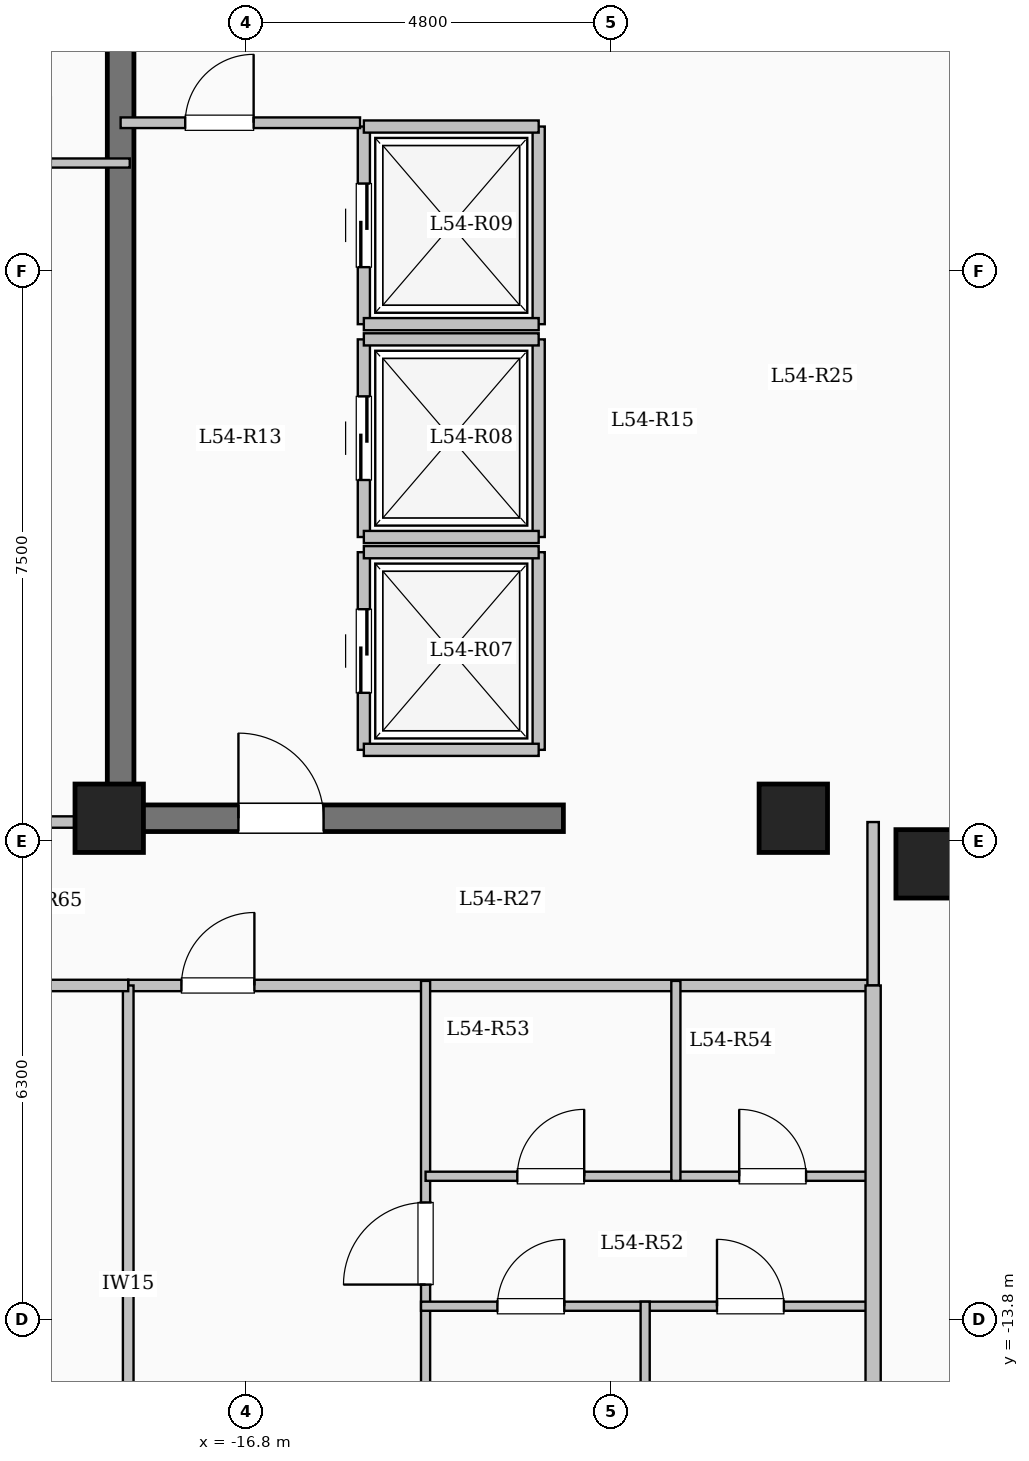
"""IFC4 building model, lengths in metres.
Left out: names, types, materials, properties, quantities, classifications, styles, units other than length and angle.
Written with IfcOpenShell. Run it as: python <this file> out.ifc"""

import sys

from ifc_helpers import new_model, si_unit, direction, frame, frame_2d, origin, origin_2d, place, context, subcontext, project, spatial, rectangle, extrude, element, fill, save


model = new_model("IFC4")
c1 = context("Model", 3, precision=1e-05, world=origin(), true_north=direction((0.0, 1.0)))
c2 = subcontext(c1, "Body", "Model", "MODEL_VIEW")
j1 = project(units=[si_unit("LENGTHUNIT", "METRE"), si_unit("PLANEANGLEUNIT", "RADIAN")], contexts=[c1])
p1 = place(None, origin())
s1 = spatial("IfcSite", under=j1, at=p1, CompositionType="ELEMENT")
p2 = place(p1, origin())
s2 = spatial("IfcBuilding", under=s1, at=p2, CompositionType="ELEMENT")
p3 = place(p2, frame((0.0, 0.0, 200.3)))
s3 = spatial("IfcBuildingStorey", under=s2, at=p3, CompositionType="ELEMENT", Elevation=200.3)
for number, where, z_axis, x_axis in (
    (1, (-7.8, -7.8, 0.0), (0.0, 0.0, 1.0), (1.0, 0.0, 0.0)),
    (2, (-9.6, -7.2, 0.0), (0.0, 0.0, 1.0), (1.0, 0.0, 0.0)),
    (3, (-18.6, -7.2, 0.0), (0.0, 0.0, 1.0), (1.0, 0.0, 0.0)),
):
    element("IfcColumn", number, at=place(p3, frame(where, z_axis=z_axis, x_axis=x_axis)), inside=s3, PredefinedType="COLUMN", context=c2, shape_type="SweptSolid", body=[
        extrude(rectangle(XDim=0.9, YDim=0.9, at=origin_2d()), origin(), (0.0, 0.0, 1.0), 3.35),
    ])
p4 = place(p3, frame((-15.25, -6.3, 0.0), z_axis=(0.0, 0.0, 1.0), x_axis=(0.0, 1.0, 0.0)))
e4 = element("IfcWall", 4, at=p4, inside=s3, PredefinedType="SOLIDWALL", context=c2, shape_type="SweptSolid", body=[
    extrude(rectangle(XDim=2.6, YDim=0.16, at=frame_2d((1.3, 0.0))), origin(), (0.0, 0.0, 1.0), 3.1),
])
p5 = place(p4, frame((0.75, 0.0, 0.0)))
e5 = element("IfcOpeningElement", 5, at=p5, cuts=e4, PredefinedType="OPENING", context=c2, shape_type="SweptSolid", body=[
    extrude(rectangle(XDim=1.1, YDim=2.15, at=frame_2d((0.55, 1.075))), frame((0.0, 0.09, 0.0), z_axis=(0.0, -1.0, 0.0), x_axis=(1.0, 0.0, 0.0)), (0.0, 0.0, 1.0), 0.18),
])
p6 = place(p3, frame((-12.95, -6.3, 0.0), z_axis=(0.0, 0.0, 1.0), x_axis=(0.0, 1.0, 0.0)))
e6 = element("IfcWall", 6, at=p6, inside=s3, PredefinedType="SOLIDWALL", context=c2, shape_type="SweptSolid", body=[
    extrude(rectangle(XDim=2.6, YDim=0.16, at=frame_2d((1.3, 0.0))), origin(), (0.0, 0.0, 1.0), 3.1),
])
for number, where, z_axis, x_axis in (
    (7, (-15.25, -6.3, 0.0), (0.0, 0.0, 1.0), (1.0, 0.0, 0.0)),
    (8, (-15.25, -3.7, 0.0), (0.0, 0.0, 1.0), (1.0, 0.0, 0.0)),
):
    element("IfcWall", number, at=place(p3, frame(where, z_axis=z_axis, x_axis=x_axis)), inside=s3, PredefinedType="SOLIDWALL", context=c2, shape_type="SweptSolid", body=[
        extrude(rectangle(XDim=2.3, YDim=0.16, at=frame_2d((1.15, 0.0))), origin(), (0.0, 0.0, 1.0), 3.1),
    ])
p7 = place(p3, frame((-15.25, -3.5, 0.0), z_axis=(0.0, 0.0, 1.0), x_axis=(0.0, 1.0, 0.0)))
e9 = element("IfcWall", 9, at=p7, inside=s3, PredefinedType="SOLIDWALL", context=c2, shape_type="SweptSolid", body=[
    extrude(rectangle(XDim=2.6, YDim=0.16, at=frame_2d((1.3, 0.0))), origin(), (0.0, 0.0, 1.0), 3.1),
])
p8 = place(p7, frame((0.75, 0.0, 0.0)))
e10 = element("IfcOpeningElement", 10, at=p8, cuts=e9, PredefinedType="OPENING", context=c2, shape_type="SweptSolid", body=[
    extrude(rectangle(XDim=1.1, YDim=2.15, at=frame_2d((0.55, 1.075))), frame((0.0, 0.09, 0.0), z_axis=(0.0, -1.0, 0.0), x_axis=(1.0, 0.0, 0.0)), (0.0, 0.0, 1.0), 0.18),
])
p9 = place(p3, frame((-12.95, -3.5, 0.0), z_axis=(0.0, 0.0, 1.0), x_axis=(0.0, 1.0, 0.0)))
e11 = element("IfcWall", 11, at=p9, inside=s3, PredefinedType="SOLIDWALL", context=c2, shape_type="SweptSolid", body=[
    extrude(rectangle(XDim=2.6, YDim=0.16, at=frame_2d((1.3, 0.0))), origin(), (0.0, 0.0, 1.0), 3.1),
])
for number, where, z_axis, x_axis in (
    (12, (-15.25, -3.5, 0.0), (0.0, 0.0, 1.0), (1.0, 0.0, 0.0)),
    (13, (-15.25, -0.9, 0.0), (0.0, 0.0, 1.0), (1.0, 0.0, 0.0)),
):
    element("IfcWall", number, at=place(p3, frame(where, z_axis=z_axis, x_axis=x_axis)), inside=s3, PredefinedType="SOLIDWALL", context=c2, shape_type="SweptSolid", body=[
        extrude(rectangle(XDim=2.3, YDim=0.16, at=frame_2d((1.15, 0.0))), origin(), (0.0, 0.0, 1.0), 3.1),
    ])
p10 = place(p3, frame((-15.25, -0.7, 0.0), z_axis=(0.0, 0.0, 1.0), x_axis=(0.0, 1.0, 0.0)))
e14 = element("IfcWall", 14, at=p10, inside=s3, PredefinedType="SOLIDWALL", context=c2, shape_type="SweptSolid", body=[
    extrude(rectangle(XDim=2.6, YDim=0.16, at=frame_2d((1.3, 0.0))), origin(), (0.0, 0.0, 1.0), 3.1),
])
p11 = place(p10, frame((0.75, 0.0, 0.0)))
e15 = element("IfcOpeningElement", 15, at=p11, cuts=e14, PredefinedType="OPENING", context=c2, shape_type="SweptSolid", body=[
    extrude(rectangle(XDim=1.1, YDim=2.15, at=frame_2d((0.55, 1.075))), frame((0.0, 0.09, 0.0), z_axis=(0.0, -1.0, 0.0), x_axis=(1.0, 0.0, 0.0)), (0.0, 0.0, 1.0), 0.18),
])
p12 = place(p3, frame((-12.95, -0.7, 0.0), z_axis=(0.0, 0.0, 1.0), x_axis=(0.0, 1.0, 0.0)))
e16 = element("IfcWall", 16, at=p12, inside=s3, PredefinedType="SOLIDWALL", context=c2, shape_type="SweptSolid", body=[
    extrude(rectangle(XDim=2.6, YDim=0.16, at=frame_2d((1.3, 0.0))), origin(), (0.0, 0.0, 1.0), 3.1),
])
for number, where, z_axis, x_axis in (
    (17, (-15.25, -0.7, 0.0), (0.0, 0.0, 1.0), (1.0, 0.0, 0.0)),
    (18, (-15.25, 1.9, 0.0), (0.0, 0.0, 1.0), (1.0, 0.0, 0.0)),
):
    element("IfcWall", number, at=place(p3, frame(where, z_axis=z_axis, x_axis=x_axis)), inside=s3, PredefinedType="SOLIDWALL", context=c2, shape_type="SweptSolid", body=[
        extrude(rectangle(XDim=2.3, YDim=0.16, at=frame_2d((1.15, 0.0))), origin(), (0.0, 0.0, 1.0), 3.1),
    ])
p13 = place(p3, frame((-18.45, -7.375, 0.0), z_axis=(0.0, 0.0, 1.0), x_axis=(0.0, 1.0, 0.0)))
e19 = element("IfcWall", 19, at=p13, inside=s3, PredefinedType="SHEAR", context=c2, shape_type="SweptSolid", body=[
    extrude(rectangle(XDim=14.05, YDim=0.35, at=frame_2d((7.025, 0.0))), origin(), (0.0, 0.0, 1.0), 3.35),
])
p14 = place(p3, frame((-18.625, -7.2, 0.0), z_axis=(0.0, 0.0, 1.0), x_axis=(1.0, 0.0, 0.0)))
e20 = element("IfcWall", 20, at=p14, inside=s3, PredefinedType="SHEAR", context=c2, shape_type="SweptSolid", body=[
    extrude(rectangle(XDim=6.0, YDim=0.35, at=frame_2d((3.0, 0.0))), origin(), (0.0, 0.0, 1.0), 3.35),
])
p15 = place(p14, frame((1.725, 0.0, 0.0)))
e21 = element("IfcOpeningElement", 21, at=p15, cuts=e20, PredefinedType="OPENING", context=c2, shape_type="SweptSolid", body=[
    extrude(rectangle(XDim=1.12, YDim=2.15, at=frame_2d((0.56, 1.075))), frame((0.0, 0.185, 0.0), z_axis=(0.0, -1.0, 0.0), x_axis=(1.0, 0.0, 0.0)), (0.0, 0.0, 1.0), 0.37),
])
p16 = place(p3, frame((-18.45, 1.95, 0.0), z_axis=(0.0, 0.0, 1.0), x_axis=(1.0, 0.0, 0.0)))
e22 = element("IfcWall", 22, at=p16, inside=s3, PredefinedType="PARTITIONING", context=c2, shape_type="SweptSolid", body=[
    extrude(rectangle(XDim=3.15, YDim=0.14, at=frame_2d((1.575, 0.0))), origin(), (0.0, 0.0, 1.0), 3.1),
])
p17 = place(p16, frame((0.85, 0.0, 0.0)))
e23 = element("IfcOpeningElement", 23, at=p17, cuts=e22, PredefinedType="OPENING", context=c2, shape_type="SweptSolid", body=[
    extrude(rectangle(XDim=0.9, YDim=2.08, at=frame_2d((0.45, 1.04))), frame((0.0, 0.08, 0.0), z_axis=(0.0, -1.0, 0.0), x_axis=(1.0, 0.0, 0.0)), (0.0, 0.0, 1.0), 0.16),
])
p18 = place(p3, frame((-18.35, -9.4, 0.0), z_axis=(0.0, 0.0, 1.0), x_axis=(1.0, 0.0, 0.0)))
e24 = element("IfcWall", 24, at=p18, inside=s3, PredefinedType="PARTITIONING", context=c2, shape_type="SweptSolid", body=[
    extrude(rectangle(XDim=9.8, YDim=0.15, at=frame_2d((4.9, 0.0))), origin(), (0.0, 0.0, 1.0), 3.1),
])
p19 = place(p18, frame((0.7, 0.0, 0.0)))
e25 = element("IfcOpeningElement", 25, at=p19, cuts=e24, PredefinedType="OPENING", context=c2, shape_type="SweptSolid", body=[
    extrude(rectangle(XDim=0.96, YDim=2.15, at=frame_2d((0.48, 1.075))), frame((0.0, 0.085, 0.0), z_axis=(0.0, -1.0, 0.0), x_axis=(1.0, 0.0, 0.0)), (0.0, 0.0, 1.0), 0.17),
])
p20 = place(p3, frame((-8.55, -9.4, 0.0), z_axis=(0.0, 0.0, 1.0), x_axis=(0.0, 1.0, 0.0)))
e26 = element("IfcWall", 26, at=p20, inside=s3, PredefinedType="PARTITIONING", context=c2, shape_type="SweptSolid", body=[
    extrude(rectangle(XDim=2.15, YDim=0.15, at=frame_2d((1.075, 0.0))), origin(), (0.0, 0.0, 1.0), 3.1),
])
p21 = place(p3, frame((-14.438, -20.9, 0.0), z_axis=(0.0, 0.0, 1.0), x_axis=(0.0, 1.0, 0.0)))
e27 = element("IfcWall", 27, at=p21, inside=s3, PredefinedType="PARTITIONING", context=c2, shape_type="SweptSolid", body=[
    extrude(rectangle(XDim=11.56, YDim=0.12, at=frame_2d((5.78, 0.0))), origin(), (0.0, 0.0, 1.0), 3.1),
])
p22 = place(p21, frame((7.565, 0.0, 0.0)))
e28 = element("IfcOpeningElement", 28, at=p22, cuts=e27, PredefinedType="OPENING", context=c2, shape_type="SweptSolid", body=[
    extrude(rectangle(XDim=1.08, YDim=2.15, at=frame_2d((0.54, 1.075))), frame((0.0, 0.07, 0.0), z_axis=(0.0, -1.0, 0.0), x_axis=(1.0, 0.0, 0.0)), (0.0, 0.0, 1.0), 0.14),
])
p23 = place(p3, frame((-14.438, -11.91, 0.0), z_axis=(0.0, 0.0, 1.0), x_axis=(1.0, 0.0, 0.0)))
e29 = element("IfcWall", 29, at=p23, inside=s3, PredefinedType="PARTITIONING", context=c2, shape_type="SweptSolid", body=[
    extrude(rectangle(XDim=3.293, YDim=0.12, at=frame_2d((1.646, 0.0))), origin(), (0.0, 0.0, 1.0), 3.1),
])
p24 = place(p23, frame((1.207, 0.0, 0.0)))
e30 = element("IfcOpeningElement", 30, at=p24, cuts=e29, PredefinedType="OPENING", context=c2, shape_type="SweptSolid", body=[
    extrude(rectangle(XDim=0.88, YDim=2.1, at=frame_2d((0.44, 1.05))), frame((0.0, 0.07, 0.0), z_axis=(0.0, -1.0, 0.0), x_axis=(1.0, 0.0, 0.0)), (0.0, 0.0, 1.0), 0.14),
])
p25 = place(p3, frame((-11.145, -11.91, 0.0), z_axis=(0.0, 0.0, 1.0), x_axis=(1.0, 0.0, 0.0)))
e31 = element("IfcWall", 31, at=p25, inside=s3, PredefinedType="PARTITIONING", context=c2, shape_type="SweptSolid", body=[
    extrude(rectangle(XDim=2.545, YDim=0.12, at=frame_2d((1.272, 0.0))), origin(), (0.0, 0.0, 1.0), 3.1),
])
p26 = place(p25, frame((0.833, 0.0, 0.0)))
e32 = element("IfcOpeningElement", 32, at=p26, cuts=e31, PredefinedType="OPENING", context=c2, shape_type="SweptSolid", body=[
    extrude(rectangle(XDim=0.88, YDim=2.1, at=frame_2d((0.44, 1.05))), frame((0.0, 0.07, 0.0), z_axis=(0.0, -1.0, 0.0), x_axis=(1.0, 0.0, 0.0)), (0.0, 0.0, 1.0), 0.14),
])
p27 = place(p3, frame((-14.498, -13.62, 0.0), z_axis=(0.0, 0.0, 1.0), x_axis=(1.0, 0.0, 0.0)))
e33 = element("IfcWall", 33, at=p27, inside=s3, PredefinedType="PARTITIONING", context=c2, shape_type="SweptSolid", body=[
    extrude(rectangle(XDim=5.958, YDim=0.12, at=frame_2d((2.979, 0.0))), origin(), (0.0, 0.0, 1.0), 3.1),
])
p28 = place(p27, frame((1.005, 0.0, 0.0)))
e34 = element("IfcOpeningElement", 34, at=p28, cuts=e33, PredefinedType="OPENING", context=c2, shape_type="SweptSolid", body=[
    extrude(rectangle(XDim=0.88, YDim=2.1, at=frame_2d((0.44, 1.05))), frame((0.0, 0.07, 0.0), z_axis=(0.0, -1.0, 0.0), x_axis=(1.0, 0.0, 0.0)), (0.0, 0.0, 1.0), 0.14),
])
p29 = place(p27, frame((3.894, 0.0, 0.0)))
e35 = element("IfcOpeningElement", 35, at=p29, cuts=e33, PredefinedType="OPENING", context=c2, shape_type="SweptSolid", body=[
    extrude(rectangle(XDim=0.88, YDim=2.1, at=frame_2d((0.44, 1.05))), frame((0.0, 0.07, 0.0), z_axis=(0.0, -1.0, 0.0), x_axis=(1.0, 0.0, 0.0)), (0.0, 0.0, 1.0), 0.14),
])
p30 = place(p3, frame((-11.145, -11.97, 0.0), z_axis=(0.0, 0.0, 1.0), x_axis=(0.0, 1.0, 0.0)))
e36 = element("IfcWall", 36, at=p30, inside=s3, PredefinedType="PARTITIONING", context=c2, shape_type="SweptSolid", body=[
    extrude(rectangle(XDim=2.63, YDim=0.12, at=frame_2d((1.315, 0.0))), origin(), (0.0, 0.0, 1.0), 3.1),
])
p31 = place(p3, frame((-11.549, -20.9, 0.0), z_axis=(0.0, 0.0, 1.0), x_axis=(0.0, 1.0, 0.0)))
e37 = element("IfcWall", 37, at=p31, inside=s3, PredefinedType="PARTITIONING", context=c2, shape_type="SweptSolid", body=[
    extrude(rectangle(XDim=7.34, YDim=0.12, at=frame_2d((3.67, 0.0))), origin(), (0.0, 0.0, 1.0), 3.1),
])
p32 = place(p3, frame((-8.55, -21.504, 0.0), z_axis=(0.0, 0.0, 1.0), x_axis=(0.0, 1.0, 0.0)))
e38 = element("IfcWall", 38, at=p32, inside=s3, PredefinedType="SOLIDWALL", context=c2, shape_type="SweptSolid", body=[
    extrude(rectangle(XDim=12.104, YDim=0.2, at=frame_2d((6.052, 0.0))), origin(), (0.0, 0.0, 1.0), 3.1),
])
p33 = place(p3, frame((-23.58, -7.25, 0.0), z_axis=(0.0, 0.0, 1.0), x_axis=(1.0, 0.0, 0.0)))
e39 = element("IfcWall", 39, at=p33, inside=s3, PredefinedType="PARTITIONING", context=c2, shape_type="SweptSolid", body=[
    extrude(rectangle(XDim=5.13, YDim=0.15, at=frame_2d((2.565, 0.0))), origin(), (0.0, 0.0, 1.0), 3.1),
])
p34 = place(p33, frame((2.18, 0.0, 0.0)))
e40 = element("IfcOpeningElement", 40, at=p34, cuts=e39, PredefinedType="OPENING", context=c2, shape_type="SweptSolid", body=[
    extrude(rectangle(XDim=0.96, YDim=2.15, at=frame_2d((0.48, 1.075))), frame((0.0, 0.085, 0.0), z_axis=(0.0, -1.0, 0.0), x_axis=(1.0, 0.0, 0.0)), (0.0, 0.0, 1.0), 0.17),
])
p35 = place(p3, frame((-18.35, -17.25, 0.0), z_axis=(0.0, 0.0, 1.0), x_axis=(0.0, 1.0, 0.0)))
e41 = element("IfcWall", 41, at=p35, inside=s3, PredefinedType="PARTITIONING", context=c2, shape_type="SweptSolid", body=[
    extrude(rectangle(XDim=7.85, YDim=0.14, at=frame_2d((3.925, 0.0))), origin(), (0.0, 0.0, 1.0), 3.1),
])
p36 = place(p3, frame((-23.58, -9.4, 0.0), z_axis=(0.0, 0.0, 1.0), x_axis=(1.0, 0.0, 0.0)))
e42 = element("IfcWall", 42, at=p36, inside=s3, PredefinedType="PARTITIONING", context=c2, shape_type="SweptSolid", body=[
    extrude(rectangle(XDim=5.23, YDim=0.15, at=frame_2d((2.615, 0.0))), origin(), (0.0, 0.0, 1.0), 3.1),
])
p37 = place(p36, frame((2.14, 0.0, 0.0)))
e43 = element("IfcOpeningElement", 43, at=p37, cuts=e42, PredefinedType="OPENING", context=c2, shape_type="SweptSolid", body=[
    extrude(rectangle(XDim=0.95, YDim=2.15, at=frame_2d((0.475, 1.075))), frame((0.0, 0.085, 0.0), z_axis=(0.0, -1.0, 0.0), x_axis=(1.0, 0.0, 0.0)), (0.0, 0.0, 1.0), 0.17),
])
p38 = place(p3, frame((-23.7, 1.42, 0.0), z_axis=(0.0, 0.0, 1.0), x_axis=(1.0, 0.0, 0.0)))
e44 = element("IfcWall", 44, at=p38, inside=s3, PredefinedType="PARTITIONING", context=c2, shape_type="SweptSolid", body=[
    extrude(rectangle(XDim=5.37, YDim=0.12, at=frame_2d((2.685, 0.0))), origin(), (0.0, 0.0, 1.0), 3.1),
])
p39 = place(p38, frame((0.937, 0.0, 0.0)))
e45 = element("IfcOpeningElement", 45, at=p39, cuts=e44, PredefinedType="OPENING", context=c2, shape_type="SweptSolid", body=[
    extrude(rectangle(XDim=0.88, YDim=2.1, at=frame_2d((0.44, 1.05))), frame((0.0, 0.07, 0.0), z_axis=(0.0, -1.0, 0.0), x_axis=(1.0, 0.0, 0.0)), (0.0, 0.0, 1.0), 0.14),
])
p40 = place(p38, frame((3.452, 0.0, 0.0)))
e46 = element("IfcOpeningElement", 46, at=p40, cuts=e44, PredefinedType="OPENING", context=c2, shape_type="SweptSolid", body=[
    extrude(rectangle(XDim=0.88, YDim=2.1, at=frame_2d((0.44, 1.05))), frame((0.0, 0.07, 0.0), z_axis=(0.0, -1.0, 0.0), x_axis=(1.0, 0.0, 0.0)), (0.0, 0.0, 1.0), 0.14),
])
p41 = place(p5, origin())
e47 = element("IfcDoor", 47, at=p41, inside=s3, OperationType="SLIDING_TO_LEFT", PredefinedType="DOOR", context=c2, shape_type="SweptSolid", body=[
    extrude(rectangle(XDim=1.1, YDim=2.15, at=frame_2d((0.55, 1.075))), frame((0.0, 0.025, 0.0), z_axis=(0.0, -1.0, 0.0), x_axis=(1.0, 0.0, 0.0)), (0.0, 0.0, 1.0), 0.05),
])
fill(e5, e47)
p42 = place(p8, origin())
e48 = element("IfcDoor", 48, at=p42, inside=s3, OperationType="SLIDING_TO_LEFT", PredefinedType="DOOR", context=c2, shape_type="SweptSolid", body=[
    extrude(rectangle(XDim=1.1, YDim=2.15, at=frame_2d((0.55, 1.075))), frame((0.0, 0.025, 0.0), z_axis=(0.0, -1.0, 0.0), x_axis=(1.0, 0.0, 0.0)), (0.0, 0.0, 1.0), 0.05),
])
fill(e10, e48)
p43 = place(p11, origin())
e49 = element("IfcDoor", 49, at=p43, inside=s3, OperationType="SLIDING_TO_LEFT", PredefinedType="DOOR", context=c2, shape_type="SweptSolid", body=[
    extrude(rectangle(XDim=1.1, YDim=2.15, at=frame_2d((0.55, 1.075))), frame((0.0, 0.025, 0.0), z_axis=(0.0, -1.0, 0.0), x_axis=(1.0, 0.0, 0.0)), (0.0, 0.0, 1.0), 0.05),
])
fill(e15, e49)
p44 = place(p15, origin())
e50 = element("IfcDoor", 50, at=p44, inside=s3, OperationType="SINGLE_SWING_LEFT", PredefinedType="DOOR", context=c2, shape_type="SweptSolid", body=[
    extrude(rectangle(XDim=1.12, YDim=2.15, at=frame_2d((0.56, 1.075))), frame((0.0, 0.025, 0.0), z_axis=(0.0, -1.0, 0.0), x_axis=(1.0, 0.0, 0.0)), (0.0, 0.0, 1.0), 0.05),
])
fill(e21, e50)
p45 = place(p17, origin())
e51 = element("IfcDoor", 51, at=p45, inside=s3, OperationType="SINGLE_SWING_RIGHT", PredefinedType="DOOR", context=c2, shape_type="SweptSolid", body=[
    extrude(rectangle(XDim=0.9, YDim=2.08, at=frame_2d((0.45, 1.04))), frame((0.0, 0.025, 0.0), z_axis=(0.0, -1.0, 0.0), x_axis=(1.0, 0.0, 0.0)), (0.0, 0.0, 1.0), 0.05),
])
fill(e23, e51)
p46 = place(p19, origin())
e52 = element("IfcDoor", 52, at=p46, inside=s3, OperationType="SINGLE_SWING_RIGHT", PredefinedType="DOOR", context=c2, shape_type="SweptSolid", body=[
    extrude(rectangle(XDim=0.96, YDim=2.15, at=frame_2d((0.48, 1.075))), frame((0.0, 0.025, 0.0), z_axis=(0.0, -1.0, 0.0), x_axis=(1.0, 0.0, 0.0)), (0.0, 0.0, 1.0), 0.05),
])
fill(e25, e52)
p47 = place(p22, origin())
e53 = element("IfcDoor", 53, at=p47, inside=s3, OperationType="SINGLE_SWING_LEFT", PredefinedType="DOOR", context=c2, shape_type="SweptSolid", body=[
    extrude(rectangle(XDim=1.08, YDim=2.15, at=frame_2d((0.54, 1.075))), frame((0.0, 0.025, 0.0), z_axis=(0.0, -1.0, 0.0), x_axis=(1.0, 0.0, 0.0)), (0.0, 0.0, 1.0), 0.05),
])
fill(e28, e53)
p48 = place(p24, origin())
e54 = element("IfcDoor", 54, at=p48, inside=s3, OperationType="SINGLE_SWING_RIGHT", PredefinedType="DOOR", context=c2, shape_type="SweptSolid", body=[
    extrude(rectangle(XDim=0.88, YDim=2.1, at=frame_2d((0.44, 1.05))), frame((0.0, 0.025, 0.0), z_axis=(0.0, -1.0, 0.0), x_axis=(1.0, 0.0, 0.0)), (0.0, 0.0, 1.0), 0.05),
])
fill(e30, e54)
p49 = place(p26, origin())
e55 = element("IfcDoor", 55, at=p49, inside=s3, OperationType="SINGLE_SWING_LEFT", PredefinedType="DOOR", context=c2, shape_type="SweptSolid", body=[
    extrude(rectangle(XDim=0.88, YDim=2.1, at=frame_2d((0.44, 1.05))), frame((0.0, 0.025, 0.0), z_axis=(0.0, -1.0, 0.0), x_axis=(1.0, 0.0, 0.0)), (0.0, 0.0, 1.0), 0.05),
])
fill(e32, e55)
p50 = place(p28, origin())
e56 = element("IfcDoor", 56, at=p50, inside=s3, OperationType="SINGLE_SWING_RIGHT", PredefinedType="DOOR", context=c2, shape_type="SweptSolid", body=[
    extrude(rectangle(XDim=0.88, YDim=2.1, at=frame_2d((0.44, 1.05))), frame((0.0, 0.025, 0.0), z_axis=(0.0, -1.0, 0.0), x_axis=(1.0, 0.0, 0.0)), (0.0, 0.0, 1.0), 0.05),
])
fill(e34, e56)
p51 = place(p29, origin())
e57 = element("IfcDoor", 57, at=p51, inside=s3, OperationType="SINGLE_SWING_LEFT", PredefinedType="DOOR", context=c2, shape_type="SweptSolid", body=[
    extrude(rectangle(XDim=0.88, YDim=2.1, at=frame_2d((0.44, 1.05))), frame((0.0, 0.025, 0.0), z_axis=(0.0, -1.0, 0.0), x_axis=(1.0, 0.0, 0.0)), (0.0, 0.0, 1.0), 0.05),
])
fill(e35, e57)
save(model, sys.argv[1])
